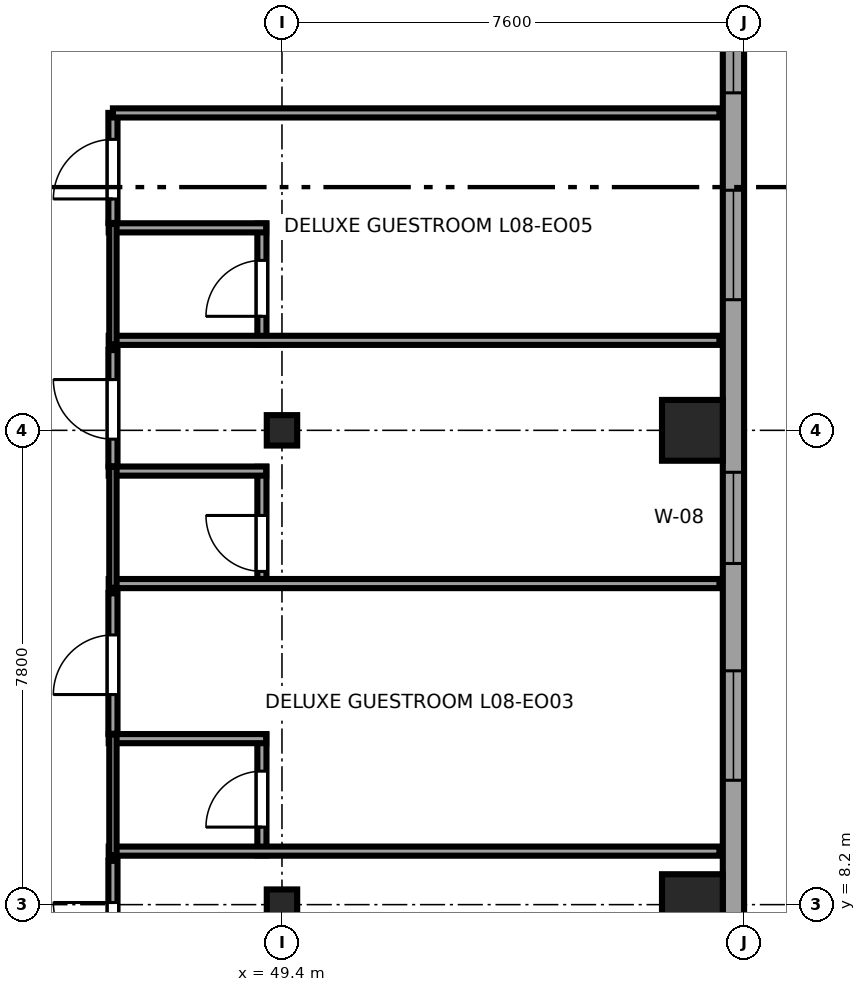
"""IFC4 building model, lengths in metres.
Left out: names, types, materials, properties, quantities, classifications, styles, units other than length and angle.
Written with IfcOpenShell. Run it as: python <this file> out.ifc"""

import sys

from ifc_helpers import new_model, si_unit, direction, frame, frame_2d, origin, origin_2d, place, context, subcontext, project, spatial, rectangle, i_section, extrude, source, transform, mapped, element, fill, save


model = new_model("IFC4")
c1 = context("Model", 3, precision=1e-05, world=origin(), true_north=direction((0.0, 1.0)))
c2 = subcontext(c1, "Body", "Model", "MODEL_VIEW")
j1 = project(units=[si_unit("LENGTHUNIT", "METRE"), si_unit("PLANEANGLEUNIT", "RADIAN")], contexts=[c1])
p1 = place(None, origin())
s1 = spatial("IfcSite", under=j1, at=p1, CompositionType="ELEMENT")
p2 = place(p1, origin())
s2 = spatial("IfcBuilding", under=s1, at=p2, CompositionType="ELEMENT")
p3 = place(p2, frame((0.0, 0.0, 39.1)))
s3 = spatial("IfcBuildingStorey", under=s2, at=p3, CompositionType="ELEMENT", Elevation=39.1)
m1 = source(origin(), c2, "Body", "SweptSolid", [
    extrude(i_section(OverallWidth=0.5, OverallDepth=0.5, WebThickness=0.028, FlangeThickness=0.045, at=origin_2d()), origin(), (0.0, 0.0, 1.0), 3.55),
])
for number, where, z_axis, x_axis in (
    (1, (49.4, 8.2, 0.0), (0.0, 0.0, 1.0), (1.0, 0.0, 0.0)),
    (2, (49.4, 16.0, 0.0), (0.0, 0.0, 1.0), (1.0, 0.0, 0.0)),
):
    element("IfcColumn", number, at=place(p3, frame(where, z_axis=z_axis, x_axis=x_axis)), inside=s3, PredefinedType="COLUMN", context=c2, shape_type="MappedRepresentation", body=[
        mapped(m1, transform((0.0, 0.0, 0.0), x_axis=(1.0, 0.0, 0.0), y_axis=(0.0, 1.0, 0.0), z_axis=(0.0, 0.0, 1.0), scale=1.0)),
    ])
m2 = source(origin(), c2, "Body", "SweptSolid", [
    extrude(rectangle(XDim=1.0, YDim=1.0, at=origin_2d()), origin(), (0.0, 0.0, 1.0), 3.55),
])
for number, where, z_axis, x_axis in (
    (3, (56.15, 8.2, 0.0), (0.0, 0.0, 1.0), (1.0, 0.0, 0.0)),
    (4, (56.15, 16.0, 0.0), (0.0, 0.0, 1.0), (1.0, 0.0, 0.0)),
):
    element("IfcColumn", number, at=place(p3, frame(where, z_axis=z_axis, x_axis=x_axis)), inside=s3, PredefinedType="COLUMN", context=c2, shape_type="MappedRepresentation", body=[
        mapped(m2, transform((0.0, 0.0, 0.0), x_axis=(1.0, 0.0, 0.0), y_axis=(0.0, 1.0, 0.0), z_axis=(0.0, 0.0, 1.0), scale=1.0)),
    ])
p4 = place(p3, frame((56.825, 4.617, 0.0), z_axis=(0.0, 0.0, 1.0), x_axis=(0.0, 1.0, 0.0)))
e5 = element("IfcWall", 5, at=p4, inside=s3, PredefinedType="SOLIDWALL", context=c2, shape_type="SweptSolid", body=[
    extrude(rectangle(XDim=36.766, YDim=0.35, at=frame_2d((18.383, 0.0))), origin(), (0.0, 0.0, 1.0), 3.37),
])
p5 = place(p4, frame((0.626, 0.0, 0.68)))
e6 = element("IfcOpeningElement", 6, at=p5, cuts=e5, PredefinedType="OPENING", context=c2, shape_type="SweptSolid", body=[
    extrude(rectangle(XDim=1.8, YDim=1.85, at=frame_2d((0.9, 0.925))), frame((0.0, 0.185, 0.0), z_axis=(0.0, -1.0, 0.0), x_axis=(1.0, 0.0, 0.0)), (0.0, 0.0, 1.0), 0.37),
])
p6 = place(p4, frame((5.628, 0.0, 0.68)))
e7 = element("IfcOpeningElement", 7, at=p6, cuts=e5, PredefinedType="OPENING", context=c2, shape_type="SweptSolid", body=[
    extrude(rectangle(XDim=1.8, YDim=1.85, at=frame_2d((0.9, 0.925))), frame((0.0, 0.185, 0.0), z_axis=(0.0, -1.0, 0.0), x_axis=(1.0, 0.0, 0.0)), (0.0, 0.0, 1.0), 0.37),
])
p7 = place(p4, frame((13.531, 0.0, 0.68)))
e8 = element("IfcOpeningElement", 8, at=p7, cuts=e5, PredefinedType="OPENING", context=c2, shape_type="SweptSolid", body=[
    extrude(rectangle(XDim=1.8, YDim=1.85, at=frame_2d((0.9, 0.925))), frame((0.0, 0.185, 0.0), z_axis=(0.0, -1.0, 0.0), x_axis=(1.0, 0.0, 0.0)), (0.0, 0.0, 1.0), 0.37),
])
p8 = place(p4, frame((16.933, 0.0, 0.68)))
e9 = element("IfcOpeningElement", 9, at=p8, cuts=e5, PredefinedType="OPENING", context=c2, shape_type="SweptSolid", body=[
    extrude(rectangle(XDim=1.8, YDim=1.85, at=frame_2d((0.9, 0.925))), frame((0.0, 0.185, 0.0), z_axis=(0.0, -1.0, 0.0), x_axis=(1.0, 0.0, 0.0)), (0.0, 0.0, 1.0), 0.37),
])
p9 = place(p4, frame((20.885, 0.0, 0.68)))
e10 = element("IfcOpeningElement", 10, at=p9, cuts=e5, PredefinedType="OPENING", context=c2, shape_type="SweptSolid", body=[
    extrude(rectangle(XDim=1.8, YDim=1.85, at=frame_2d((0.9, 0.925))), frame((0.0, 0.185, 0.0), z_axis=(0.0, -1.0, 0.0), x_axis=(1.0, 0.0, 0.0)), (0.0, 0.0, 1.0), 0.37),
])
p10 = place(p4, frame((25.936, 0.0, 0.68)))
e11 = element("IfcOpeningElement", 11, at=p10, cuts=e5, PredefinedType="OPENING", context=c2, shape_type="SweptSolid", body=[
    extrude(rectangle(XDim=1.8, YDim=1.85, at=frame_2d((0.9, 0.925))), frame((0.0, 0.185, 0.0), z_axis=(0.0, -1.0, 0.0), x_axis=(1.0, 0.0, 0.0)), (0.0, 0.0, 1.0), 0.37),
])
p11 = place(p4, frame((30.388, 0.0, 0.68)))
e12 = element("IfcOpeningElement", 12, at=p11, cuts=e5, PredefinedType="OPENING", context=c2, shape_type="SweptSolid", body=[
    extrude(rectangle(XDim=1.8, YDim=1.85, at=frame_2d((0.9, 0.925))), frame((0.0, 0.185, 0.0), z_axis=(0.0, -1.0, 0.0), x_axis=(1.0, 0.0, 0.0)), (0.0, 0.0, 1.0), 0.37),
])
p12 = place(p4, frame((33.29, 0.0, 0.68)))
e13 = element("IfcOpeningElement", 13, at=p12, cuts=e5, PredefinedType="OPENING", context=c2, shape_type="SweptSolid", body=[
    extrude(rectangle(XDim=1.8, YDim=1.85, at=frame_2d((0.9, 0.925))), frame((0.0, 0.185, 0.0), z_axis=(0.0, -1.0, 0.0), x_axis=(1.0, 0.0, 0.0)), (0.0, 0.0, 1.0), 0.37),
])
p13 = place(p4, frame((9.193, 0.0, 0.62)))
e14 = element("IfcOpeningElement", 14, at=p13, cuts=e5, PredefinedType="OPENING", context=c2, shape_type="SweptSolid", body=[
    extrude(rectangle(XDim=1.5, YDim=1.55, at=frame_2d((0.75, 0.775))), frame((0.0, 0.185, 0.0), z_axis=(0.0, -1.0, 0.0), x_axis=(1.0, 0.0, 0.0)), (0.0, 0.0, 1.0), 0.37),
])
p14 = place(p3, frame((49.07, 9.01, 0.0), z_axis=(0.0, 0.0, 1.0), x_axis=(0.0, 1.0, 0.0)))
e15 = element("IfcWall", 15, at=p14, inside=s3, PredefinedType="PARTITIONING", context=c2, shape_type="SweptSolid", body=[
    extrude(rectangle(XDim=1.99, YDim=0.15, at=frame_2d((0.995, 0.0))), origin(), (0.0, 0.0, 1.0), 3.37),
])
p15 = place(p14, frame((0.465, 0.0, 0.0)))
e16 = element("IfcOpeningElement", 16, at=p15, cuts=e15, PredefinedType="OPENING", context=c2, shape_type="SweptSolid", body=[
    extrude(rectangle(XDim=0.92, YDim=2.01, at=frame_2d((0.46, 1.005))), frame((0.0, 0.085, 0.0), z_axis=(0.0, -1.0, 0.0), x_axis=(1.0, 0.0, 0.0)), (0.0, 0.0, 1.0), 0.17),
])
p16 = place(p3, frame((46.55, 9.08, 0.0), z_axis=(0.0, 0.0, 1.0), x_axis=(1.0, 0.0, 0.0)))
e17 = element("IfcWall", 17, at=p16, inside=s3, PredefinedType="PARTITIONING", context=c2, shape_type="SweptSolid", body=[
    extrude(rectangle(XDim=10.045, YDim=0.15, at=frame_2d((5.022, 0.0))), origin(), (0.0, 0.0, 1.0), 3.37),
])
p17 = place(p3, frame((46.55, 10.93, 0.0), z_axis=(0.0, 0.0, 1.0), x_axis=(1.0, 0.0, 0.0)))
e18 = element("IfcWall", 18, at=p17, inside=s3, PredefinedType="PARTITIONING", context=c2, shape_type="SweptSolid", body=[
    extrude(rectangle(XDim=2.59, YDim=0.15, at=frame_2d((1.295, 0.0))), origin(), (0.0, 0.0, 1.0), 3.37),
])
p18 = place(p3, frame((46.62, 9.01, 0.0), z_axis=(0.0, 0.0, 1.0), x_axis=(0.0, 1.0, 0.0)))
e19 = element("IfcWall", 19, at=p18, inside=s3, PredefinedType="PLUMBINGWALL", context=c2, shape_type="SweptSolid", body=[
    extrude(rectangle(XDim=1.99, YDim=0.12, at=frame_2d((0.995, 0.0))), origin(), (0.0, 0.0, 1.0), 3.37),
])
p19 = place(p3, frame((49.07, 13.41, 0.0), z_axis=(0.0, 0.0, 1.0), x_axis=(0.0, 1.0, 0.0)))
e20 = element("IfcWall", 20, at=p19, inside=s3, PredefinedType="PARTITIONING", context=c2, shape_type="SweptSolid", body=[
    extrude(rectangle(XDim=1.99, YDim=0.15, at=frame_2d((0.995, 0.0))), origin(), (0.0, 0.0, 1.0), 3.37),
])
p20 = place(p19, frame((0.27, 0.0, 0.0)))
e21 = element("IfcOpeningElement", 21, at=p20, cuts=e20, PredefinedType="OPENING", context=c2, shape_type="SweptSolid", body=[
    extrude(rectangle(XDim=0.92, YDim=2.01, at=frame_2d((0.46, 1.005))), frame((0.0, 0.085, 0.0), z_axis=(0.0, -1.0, 0.0), x_axis=(1.0, 0.0, 0.0)), (0.0, 0.0, 1.0), 0.17),
])
p21 = place(p3, frame((46.55, 13.48, 0.0), z_axis=(0.0, 0.0, 1.0), x_axis=(1.0, 0.0, 0.0)))
e22 = element("IfcWall", 22, at=p21, inside=s3, PredefinedType="PARTITIONING", context=c2, shape_type="SweptSolid", body=[
    extrude(rectangle(XDim=10.045, YDim=0.15, at=frame_2d((5.022, 0.0))), origin(), (0.0, 0.0, 1.0), 3.37),
])
p22 = place(p3, frame((46.55, 15.33, 0.0), z_axis=(0.0, 0.0, 1.0), x_axis=(1.0, 0.0, 0.0)))
e23 = element("IfcWall", 23, at=p22, inside=s3, PredefinedType="PARTITIONING", context=c2, shape_type="SweptSolid", body=[
    extrude(rectangle(XDim=2.59, YDim=0.15, at=frame_2d((1.295, 0.0))), origin(), (0.0, 0.0, 1.0), 3.37),
])
p23 = place(p3, frame((46.62, 13.41, 0.0), z_axis=(0.0, 0.0, 1.0), x_axis=(0.0, 1.0, 0.0)))
e24 = element("IfcWall", 24, at=p23, inside=s3, PredefinedType="PLUMBINGWALL", context=c2, shape_type="SweptSolid", body=[
    extrude(rectangle(XDim=1.99, YDim=0.12, at=frame_2d((0.995, 0.0))), origin(), (0.0, 0.0, 1.0), 3.37),
])
p24 = place(p3, frame((49.07, 17.41, 0.0), z_axis=(0.0, 0.0, 1.0), x_axis=(0.0, 1.0, 0.0)))
e25 = element("IfcWall", 25, at=p24, inside=s3, PredefinedType="PARTITIONING", context=c2, shape_type="SweptSolid", body=[
    extrude(rectangle(XDim=1.99, YDim=0.15, at=frame_2d((0.995, 0.0))), origin(), (0.0, 0.0, 1.0), 3.37),
])
p25 = place(p24, frame((0.465, 0.0, 0.0)))
e26 = element("IfcOpeningElement", 26, at=p25, cuts=e25, PredefinedType="OPENING", context=c2, shape_type="SweptSolid", body=[
    extrude(rectangle(XDim=0.92, YDim=2.01, at=frame_2d((0.46, 1.005))), frame((0.0, 0.085, 0.0), z_axis=(0.0, -1.0, 0.0), x_axis=(1.0, 0.0, 0.0)), (0.0, 0.0, 1.0), 0.17),
])
p26 = place(p3, frame((46.55, 17.48, 0.0), z_axis=(0.0, 0.0, 1.0), x_axis=(1.0, 0.0, 0.0)))
e27 = element("IfcWall", 27, at=p26, inside=s3, PredefinedType="PARTITIONING", context=c2, shape_type="SweptSolid", body=[
    extrude(rectangle(XDim=10.045, YDim=0.15, at=frame_2d((5.022, 0.0))), origin(), (0.0, 0.0, 1.0), 3.37),
])
p27 = place(p3, frame((46.55, 19.33, 0.0), z_axis=(0.0, 0.0, 1.0), x_axis=(1.0, 0.0, 0.0)))
e28 = element("IfcWall", 28, at=p27, inside=s3, PredefinedType="PARTITIONING", context=c2, shape_type="SweptSolid", body=[
    extrude(rectangle(XDim=2.59, YDim=0.15, at=frame_2d((1.295, 0.0))), origin(), (0.0, 0.0, 1.0), 3.37),
])
p28 = place(p3, frame((46.62, 17.41, 0.0), z_axis=(0.0, 0.0, 1.0), x_axis=(0.0, 1.0, 0.0)))
e29 = element("IfcWall", 29, at=p28, inside=s3, PredefinedType="PLUMBINGWALL", context=c2, shape_type="SweptSolid", body=[
    extrude(rectangle(XDim=1.99, YDim=0.12, at=frame_2d((0.995, 0.0))), origin(), (0.0, 0.0, 1.0), 3.37),
])
p29 = place(p3, frame((46.62, 6.61, 0.0), z_axis=(0.0, 0.0, 1.0), x_axis=(0.0, 1.0, 0.0)))
e30 = element("IfcWall", 30, at=p29, inside=s3, PredefinedType="PARTITIONING", context=c2, shape_type="SweptSolid", body=[
    extrude(rectangle(XDim=2.31, YDim=0.15, at=frame_2d((1.155, 0.0))), origin(), (0.0, 0.0, 1.0), 3.37),
])
p30 = place(p29, frame((0.645, 0.0, 0.0)))
e31 = element("IfcOpeningElement", 31, at=p30, cuts=e30, PredefinedType="OPENING", context=c2, shape_type="SweptSolid", body=[
    extrude(rectangle(XDim=0.98, YDim=2.12, at=frame_2d((0.49, 1.06))), frame((0.0, 0.085, 0.0), z_axis=(0.0, -1.0, 0.0), x_axis=(1.0, 0.0, 0.0)), (0.0, 0.0, 1.0), 0.17),
])
p31 = place(p3, frame((46.62, 11.01, 0.0), z_axis=(0.0, 0.0, 1.0), x_axis=(0.0, 1.0, 0.0)))
e32 = element("IfcWall", 32, at=p31, inside=s3, PredefinedType="PARTITIONING", context=c2, shape_type="SweptSolid", body=[
    extrude(rectangle(XDim=2.31, YDim=0.15, at=frame_2d((1.155, 0.0))), origin(), (0.0, 0.0, 1.0), 3.37),
])
p32 = place(p31, frame((0.645, 0.0, 0.0)))
e33 = element("IfcOpeningElement", 33, at=p32, cuts=e32, PredefinedType="OPENING", context=c2, shape_type="SweptSolid", body=[
    extrude(rectangle(XDim=0.98, YDim=2.12, at=frame_2d((0.49, 1.06))), frame((0.0, 0.085, 0.0), z_axis=(0.0, -1.0, 0.0), x_axis=(1.0, 0.0, 0.0)), (0.0, 0.0, 1.0), 0.17),
])
p33 = place(p3, frame((46.62, 15.41, 0.0), z_axis=(0.0, 0.0, 1.0), x_axis=(0.0, 1.0, 0.0)))
e34 = element("IfcWall", 34, at=p33, inside=s3, PredefinedType="PARTITIONING", context=c2, shape_type="SweptSolid", body=[
    extrude(rectangle(XDim=1.91, YDim=0.15, at=frame_2d((0.955, 0.0))), origin(), (0.0, 0.0, 1.0), 3.37),
])
p34 = place(p33, frame((0.445, 0.0, 0.0)))
e35 = element("IfcOpeningElement", 35, at=p34, cuts=e34, PredefinedType="OPENING", context=c2, shape_type="SweptSolid", body=[
    extrude(rectangle(XDim=0.98, YDim=2.12, at=frame_2d((0.49, 1.06))), frame((0.0, 0.085, 0.0), z_axis=(0.0, -1.0, 0.0), x_axis=(1.0, 0.0, 0.0)), (0.0, 0.0, 1.0), 0.17),
])
p35 = place(p3, frame((46.62, 19.41, 0.0), z_axis=(0.0, 0.0, 1.0), x_axis=(0.0, 1.0, 0.0)))
e36 = element("IfcWall", 36, at=p35, inside=s3, PredefinedType="PARTITIONING", context=c2, shape_type="SweptSolid", body=[
    extrude(rectangle(XDim=1.81, YDim=0.15, at=frame_2d((0.905, 0.0))), origin(), (0.0, 0.0, 1.0), 3.37),
])
p36 = place(p35, frame((0.395, 0.0, 0.0)))
e37 = element("IfcOpeningElement", 37, at=p36, cuts=e36, PredefinedType="OPENING", context=c2, shape_type="SweptSolid", body=[
    extrude(rectangle(XDim=0.98, YDim=2.12, at=frame_2d((0.49, 1.06))), frame((0.0, 0.085, 0.0), z_axis=(0.0, -1.0, 0.0), x_axis=(1.0, 0.0, 0.0)), (0.0, 0.0, 1.0), 0.17),
])
p37 = place(p3, frame((46.62, 21.22, 0.0), z_axis=(0.0, 0.0, 1.0), x_axis=(1.0, 0.0, 0.0)))
e38 = element("IfcWall", 38, at=p37, inside=s3, PredefinedType="PARTITIONING", context=c2, shape_type="SweptSolid", body=[
    extrude(rectangle(XDim=9.975, YDim=0.15, at=frame_2d((4.987, 0.0))), origin(), (0.0, 0.0, 1.0), 3.37),
])
m3 = source(origin(), c2, "Body", "SweptSolid", [
    extrude(rectangle(XDim=1.8, YDim=1.85, at=frame_2d((0.9, 0.925))), frame((0.0, 0.09, 0.0), z_axis=(0.0, -1.0, 0.0), x_axis=(1.0, 0.0, 0.0)), (0.0, 0.0, 1.0), 0.06),
])
p38 = place(p6, origin())
e39 = element("IfcWindow", 39, at=p38, inside=s3, PartitioningType="TRIPLE_PANEL_HORIZONTAL", PredefinedType="WINDOW", context=c2, shape_type="MappedRepresentation", body=[
    mapped(m3, transform((0.0, 0.0, 0.0), x_axis=(1.0, 0.0, 0.0), y_axis=(0.0, 1.0, 0.0), z_axis=(0.0, 0.0, 1.0), scale=1.0)),
])
fill(e7, e39)
p39 = place(p7, origin())
e40 = element("IfcWindow", 40, at=p39, inside=s3, PartitioningType="TRIPLE_PANEL_HORIZONTAL", PredefinedType="WINDOW", context=c2, shape_type="MappedRepresentation", body=[
    mapped(m3, transform((0.0, 0.0, 0.0), x_axis=(1.0, 0.0, 0.0), y_axis=(0.0, 1.0, 0.0), z_axis=(0.0, 0.0, 1.0), scale=1.0)),
])
fill(e8, e40)
p40 = place(p8, origin())
e41 = element("IfcWindow", 41, at=p40, inside=s3, PartitioningType="TRIPLE_PANEL_HORIZONTAL", PredefinedType="WINDOW", context=c2, shape_type="MappedRepresentation", body=[
    mapped(m3, transform((0.0, 0.0, 0.0), x_axis=(1.0, 0.0, 0.0), y_axis=(0.0, 1.0, 0.0), z_axis=(0.0, 0.0, 1.0), scale=1.0)),
])
fill(e9, e41)
m4 = source(origin(), c2, "Body", "SweptSolid", [
    extrude(rectangle(XDim=1.5, YDim=1.55, at=frame_2d((0.75, 0.775))), frame((0.0, 0.09, 0.0), z_axis=(0.0, -1.0, 0.0), x_axis=(1.0, 0.0, 0.0)), (0.0, 0.0, 1.0), 0.06),
])
p41 = place(p13, origin())
e42 = element("IfcWindow", 42, at=p41, inside=s3, PartitioningType="SINGLE_PANEL", PredefinedType="WINDOW", context=c2, shape_type="MappedRepresentation", body=[
    mapped(m4, transform((0.0, 0.0, 0.0), x_axis=(1.0, 0.0, 0.0), y_axis=(0.0, 1.0, 0.0), z_axis=(0.0, 0.0, 1.0), scale=1.0)),
])
fill(e14, e42)
m5 = source(origin(), c2, "Body", "SweptSolid", [
    extrude(rectangle(XDim=0.92, YDim=2.01, at=frame_2d((0.46, 1.005))), frame((0.0, 0.025, 0.0), z_axis=(0.0, -1.0, 0.0), x_axis=(1.0, 0.0, 0.0)), (0.0, 0.0, 1.0), 0.05),
])
p42 = place(p15, origin())
e43 = element("IfcDoor", 43, at=p42, inside=s3, OperationType="SINGLE_SWING_LEFT", PredefinedType="DOOR", context=c2, shape_type="MappedRepresentation", body=[
    mapped(m5, transform((0.0, 0.0, 0.0), x_axis=(1.0, 0.0, 0.0), y_axis=(0.0, 1.0, 0.0), z_axis=(0.0, 0.0, 1.0), scale=1.0)),
])
fill(e16, e43)
p43 = place(p20, origin())
e44 = element("IfcDoor", 44, at=p43, inside=s3, OperationType="SINGLE_SWING_RIGHT", PredefinedType="DOOR", context=c2, shape_type="MappedRepresentation", body=[
    mapped(m5, transform((0.0, 0.0, 0.0), x_axis=(1.0, 0.0, 0.0), y_axis=(0.0, 1.0, 0.0), z_axis=(0.0, 0.0, 1.0), scale=1.0)),
])
fill(e21, e44)
p44 = place(p25, origin())
e45 = element("IfcDoor", 45, at=p44, inside=s3, OperationType="SINGLE_SWING_LEFT", PredefinedType="DOOR", context=c2, shape_type="MappedRepresentation", body=[
    mapped(m5, transform((0.0, 0.0, 0.0), x_axis=(1.0, 0.0, 0.0), y_axis=(0.0, 1.0, 0.0), z_axis=(0.0, 0.0, 1.0), scale=1.0)),
])
fill(e26, e45)
m6 = source(origin(), c2, "Body", "SweptSolid", [
    extrude(rectangle(XDim=0.98, YDim=2.12, at=frame_2d((0.49, 1.06))), frame((0.0, 0.025, 0.0), z_axis=(0.0, -1.0, 0.0), x_axis=(1.0, 0.0, 0.0)), (0.0, 0.0, 1.0), 0.05),
])
p45 = place(p30, origin())
e46 = element("IfcDoor", 46, at=p45, inside=s3, OperationType="SINGLE_SWING_RIGHT", PredefinedType="DOOR", context=c2, shape_type="MappedRepresentation", body=[
    mapped(m6, transform((0.0, 0.0, 0.0), x_axis=(1.0, 0.0, 0.0), y_axis=(0.0, 1.0, 0.0), z_axis=(0.0, 0.0, 1.0), scale=1.0)),
])
fill(e31, e46)
p46 = place(p32, origin())
e47 = element("IfcDoor", 47, at=p46, inside=s3, OperationType="SINGLE_SWING_LEFT", PredefinedType="DOOR", context=c2, shape_type="MappedRepresentation", body=[
    mapped(m6, transform((0.0, 0.0, 0.0), x_axis=(1.0, 0.0, 0.0), y_axis=(0.0, 1.0, 0.0), z_axis=(0.0, 0.0, 1.0), scale=1.0)),
])
fill(e33, e47)
p47 = place(p34, origin())
e48 = element("IfcDoor", 48, at=p47, inside=s3, OperationType="SINGLE_SWING_RIGHT", PredefinedType="DOOR", context=c2, shape_type="MappedRepresentation", body=[
    mapped(m6, transform((0.0, 0.0, 0.0), x_axis=(1.0, 0.0, 0.0), y_axis=(0.0, 1.0, 0.0), z_axis=(0.0, 0.0, 1.0), scale=1.0)),
])
fill(e35, e48)
p48 = place(p36, origin())
e49 = element("IfcDoor", 49, at=p48, inside=s3, OperationType="SINGLE_SWING_LEFT", PredefinedType="DOOR", context=c2, shape_type="MappedRepresentation", body=[
    mapped(m6, transform((0.0, 0.0, 0.0), x_axis=(1.0, 0.0, 0.0), y_axis=(0.0, 1.0, 0.0), z_axis=(0.0, 0.0, 1.0), scale=1.0)),
])
fill(e37, e49)
save(model, sys.argv[1])
